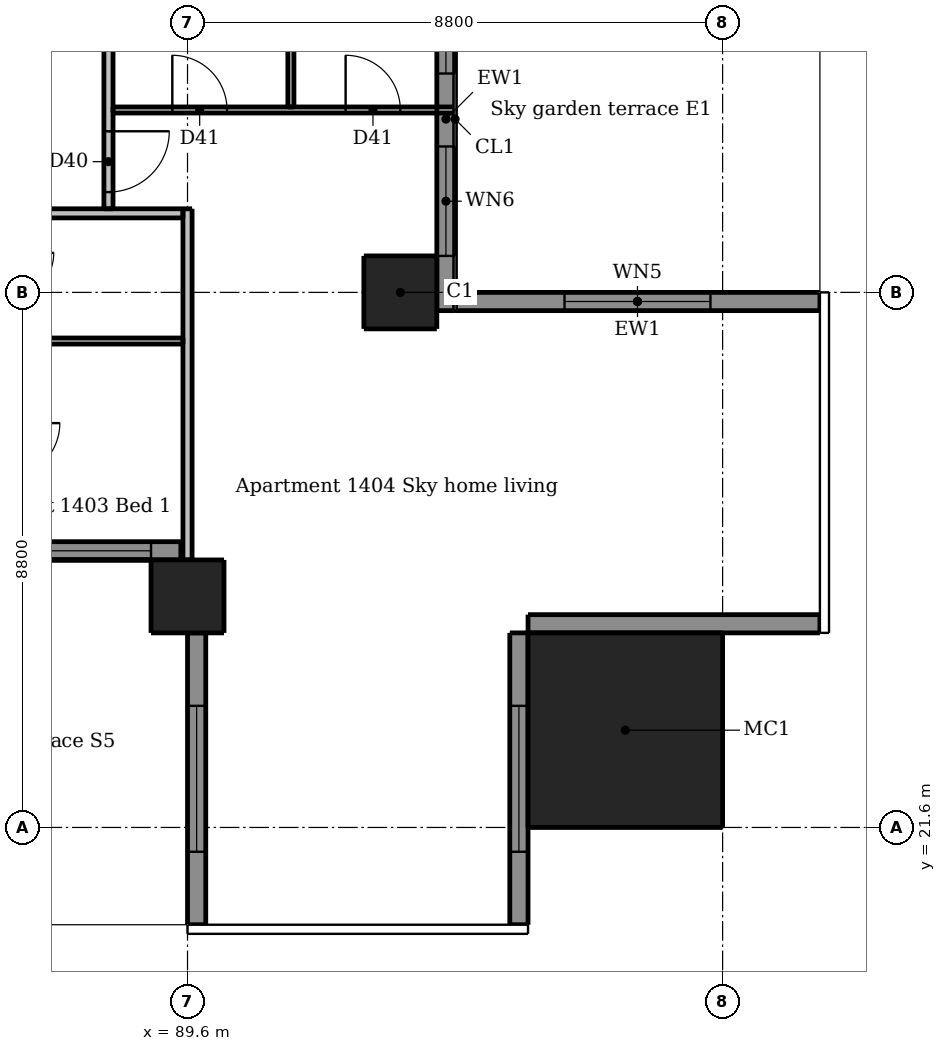
"""IFC4 building model, lengths in metres.
Left out: names, types, materials, properties, quantities, classifications, styles, units other than length and angle.
Written with IfcOpenShell. Run it as: python <this file> out.ifc"""

import sys

from ifc_helpers import new_model, si_unit, direction, frame, frame_2d, origin, origin_2d, place, context, subcontext, project, spatial, rectangle, extrude, element, fill, save


model = new_model("IFC4")
c1 = context("Model", 3, precision=1e-05, world=origin(), true_north=direction((0.0, 1.0)))
c2 = subcontext(c1, "Body", "Model", "MODEL_VIEW")
j1 = project(units=[si_unit("LENGTHUNIT", "METRE"), si_unit("PLANEANGLEUNIT", "RADIAN")], contexts=[c1])
p1 = place(None, origin())
s1 = spatial("IfcSite", under=j1, at=p1, CompositionType="ELEMENT")
p2 = place(p1, origin())
s2 = spatial("IfcBuilding", under=s1, at=p2, CompositionType="ELEMENT")
p3 = place(p2, frame((0.0, 0.0, 53.2)))
s3 = spatial("IfcBuildingStorey", under=s2, at=p3, CompositionType="ELEMENT", Elevation=53.2)
for number, where, z_axis, x_axis in (
    (1, (89.6, 25.4, 0.0), (0.0, 0.0, 1.0), (1.0, 0.0, 0.0)),
    (2, (93.1, 30.4, 0.0), (0.0, 0.0, 1.0), (1.0, 0.0, 0.0)),
):
    element("IfcColumn", number, at=place(p3, frame(where, z_axis=z_axis, x_axis=x_axis)), inside=s3, PredefinedType="COLUMN", context=c2, shape_type="SweptSolid", body=[
        extrude(rectangle(XDim=1.2, YDim=1.2, at=origin_2d()), origin(), (0.0, 0.0, 1.0), 3.05),
    ])
p4 = place(p3, frame((96.8, 23.2, 0.0), z_axis=(0.0, 0.0, 1.0), x_axis=(1.0, 0.0, 0.0)))
e3 = element("IfcColumn", 3, at=p4, inside=s3, PredefinedType="COLUMN", context=c2, shape_type="SweptSolid", body=[
    extrude(rectangle(XDim=3.2, YDim=3.2, at=origin_2d()), origin(), (0.0, 0.0, 1.0), 3.3),
])
p5 = place(p3, frame((89.75, 24.8, 0.0), z_axis=(0.0, 0.0, 1.0), x_axis=(0.0, -1.0, 0.0)))
e4 = element("IfcWall", 4, at=p5, inside=s3, PredefinedType="SOLIDWALL", context=c2, shape_type="SweptSolid", body=[
    extrude(rectangle(XDim=4.8, YDim=0.3, at=frame_2d((2.4, 0.0))), origin(), (0.0, 0.0, 1.0), 3.05),
])
p6 = place(p5, frame((1.2, 0.0, 0.15)))
e5 = element("IfcOpeningElement", 5, at=p6, cuts=e4, PredefinedType="OPENING", context=c2, shape_type="SweptSolid", body=[
    extrude(rectangle(XDim=2.4, YDim=2.1, at=frame_2d((1.2, 1.05))), frame((0.0, 0.16, 0.0), z_axis=(0.0, -1.0, 0.0), x_axis=(1.0, 0.0, 0.0)), (0.0, 0.0, 1.0), 0.32),
])
p7 = place(p3, frame((95.05, 20.0, 0.0), z_axis=(0.0, 0.0, 1.0), x_axis=(0.0, 1.0, 0.0)))
e6 = element("IfcWall", 6, at=p7, inside=s3, PredefinedType="SOLIDWALL", context=c2, shape_type="SweptSolid", body=[
    extrude(rectangle(XDim=4.8, YDim=0.3, at=frame_2d((2.4, 0.0))), origin(), (0.0, 0.0, 1.0), 3.05),
])
p8 = place(p7, frame((1.2, 0.0, 0.15)))
e7 = element("IfcOpeningElement", 7, at=p8, cuts=e6, PredefinedType="OPENING", context=c2, shape_type="SweptSolid", body=[
    extrude(rectangle(XDim=2.4, YDim=2.1, at=frame_2d((1.2, 1.05))), frame((0.0, 0.16, 0.0), z_axis=(0.0, -1.0, 0.0), x_axis=(1.0, 0.0, 0.0)), (0.0, 0.0, 1.0), 0.32),
])
p9 = place(p3, frame((95.2, 24.95, 0.0), z_axis=(0.0, 0.0, 1.0), x_axis=(1.0, 0.0, 0.0)))
e8 = element("IfcWall", 8, at=p9, inside=s3, PredefinedType="SOLIDWALL", context=c2, shape_type="SweptSolid", body=[
    extrude(rectangle(XDim=4.8, YDim=0.3, at=frame_2d((2.4, 0.0))), origin(), (0.0, 0.0, 1.0), 3.05),
])
p10 = place(p3, frame((100.0, 30.25, 0.0), z_axis=(0.0, 0.0, 1.0), x_axis=(-1.0, 0.0, 0.0)))
e9 = element("IfcWall", 9, at=p10, inside=s3, PredefinedType="SOLIDWALL", context=c2, shape_type="SweptSolid", body=[
    extrude(rectangle(XDim=6.0, YDim=0.3, at=frame_2d((3.0, 0.0))), origin(), (0.0, 0.0, 1.0), 3.05),
])
p11 = place(p10, frame((1.8, 0.0, 0.15)))
e10 = element("IfcOpeningElement", 10, at=p11, cuts=e9, PredefinedType="OPENING", context=c2, shape_type="SweptSolid", body=[
    extrude(rectangle(XDim=2.4, YDim=2.1, at=frame_2d((1.2, 1.05))), frame((0.0, 0.16, 0.0), z_axis=(0.0, -1.0, 0.0), x_axis=(1.0, 0.0, 0.0)), (0.0, 0.0, 1.0), 0.32),
])
p12 = place(p3, frame((83.6, 26.15, 0.0), z_axis=(0.0, 0.0, 1.0), x_axis=(1.0, 0.0, 0.0)))
e11 = element("IfcWall", 11, at=p12, inside=s3, PredefinedType="SOLIDWALL", context=c2, shape_type="SweptSolid", body=[
    extrude(rectangle(XDim=5.89, YDim=0.3, at=frame_2d((2.945, 0.0))), origin(), (0.0, 0.0, 1.0), 3.05),
])
p13 = place(p12, frame((0.6, 0.0, 0.15)))
e12 = element("IfcOpeningElement", 12, at=p13, cuts=e11, PredefinedType="OPENING", context=c2, shape_type="SweptSolid", body=[
    extrude(rectangle(XDim=1.8, YDim=2.1, at=frame_2d((0.9, 1.05))), frame((0.0, 0.16, 0.0), z_axis=(0.0, -1.0, 0.0), x_axis=(1.0, 0.0, 0.0)), (0.0, 0.0, 1.0), 0.32),
])
p14 = place(p12, frame((3.6, 0.0, 0.15)))
e13 = element("IfcOpeningElement", 13, at=p14, cuts=e11, PredefinedType="OPENING", context=c2, shape_type="SweptSolid", body=[
    extrude(rectangle(XDim=1.8, YDim=2.1, at=frame_2d((0.9, 1.05))), frame((0.0, 0.16, 0.0), z_axis=(0.0, -1.0, 0.0), x_axis=(1.0, 0.0, 0.0)), (0.0, 0.0, 1.0), 0.32),
])
p15 = place(p3, frame((93.85, 30.1, 0.0), z_axis=(0.0, 0.0, 1.0), x_axis=(0.0, 1.0, 0.0)))
e14 = element("IfcWall", 14, at=p15, inside=s3, PredefinedType="SOLIDWALL", context=c2, shape_type="SweptSolid", body=[
    extrude(rectangle(XDim=6.3, YDim=0.3, at=frame_2d((3.15, 0.0))), origin(), (0.0, 0.0, 1.0), 3.05),
])
p16 = place(p15, frame((0.9, 0.0, 0.15)))
e15 = element("IfcOpeningElement", 15, at=p16, cuts=e14, PredefinedType="OPENING", context=c2, shape_type="SweptSolid", body=[
    extrude(rectangle(XDim=1.8, YDim=2.1, at=frame_2d((0.9, 1.05))), frame((0.0, 0.16, 0.0), z_axis=(0.0, -1.0, 0.0), x_axis=(1.0, 0.0, 0.0)), (0.0, 0.0, 1.0), 0.32),
])
p17 = place(p15, frame((3.9, 0.0, 0.15)))
e16 = element("IfcOpeningElement", 16, at=p17, cuts=e14, PredefinedType="OPENING", context=c2, shape_type="SweptSolid", body=[
    extrude(rectangle(XDim=1.8, YDim=2.1, at=frame_2d((0.9, 1.05))), frame((0.0, 0.16, 0.0), z_axis=(0.0, -1.0, 0.0), x_axis=(1.0, 0.0, 0.0)), (0.0, 0.0, 1.0), 0.32),
])
p18 = place(p3, frame((91.3, 33.45, 0.0), z_axis=(0.0, 0.0, 1.0), x_axis=(0.0, 1.0, 0.0)))
e17 = element("IfcWall", 17, at=p18, inside=s3, PredefinedType="PARTITIONING", context=c2, shape_type="SweptSolid", body=[
    extrude(rectangle(XDim=5.875, YDim=0.1, at=frame_2d((2.938, 0.0))), origin(), (0.0, 0.0, 1.0), 3.05),
])
p19 = place(p18, frame((3.75, 0.0, 0.0)))
e18 = element("IfcOpeningElement", 18, at=p19, cuts=e17, PredefinedType="OPENING", context=c2, shape_type="SweptSolid", body=[
    extrude(rectangle(XDim=0.8, YDim=2.1, at=frame_2d((0.4, 1.05))), frame((0.0, 0.06, 0.0), z_axis=(0.0, -1.0, 0.0), x_axis=(1.0, 0.0, 0.0)), (0.0, 0.0, 1.0), 0.12),
])
p20 = place(p3, frame((88.375, 33.4, 0.0), z_axis=(0.0, 0.0, 1.0), x_axis=(1.0, 0.0, 0.0)))
e19 = element("IfcWall", 19, at=p20, inside=s3, PredefinedType="PARTITIONING", context=c2, shape_type="SweptSolid", body=[
    extrude(rectangle(XDim=5.625, YDim=0.1, at=frame_2d((2.812, 0.0))), origin(), (0.0, 0.0, 1.0), 3.05),
])
p21 = place(p20, frame((0.975, 0.0, 0.0)))
e20 = element("IfcOpeningElement", 20, at=p21, cuts=e19, PredefinedType="OPENING", context=c2, shape_type="SweptSolid", body=[
    extrude(rectangle(XDim=0.9, YDim=2.1, at=frame_2d((0.45, 1.05))), frame((0.0, 0.06, 0.0), z_axis=(0.0, -1.0, 0.0), x_axis=(1.0, 0.0, 0.0)), (0.0, 0.0, 1.0), 0.12),
])
p22 = place(p20, frame((3.825, 0.0, 0.0)))
e21 = element("IfcOpeningElement", 21, at=p22, cuts=e19, PredefinedType="OPENING", context=c2, shape_type="SweptSolid", body=[
    extrude(rectangle(XDim=0.9, YDim=2.1, at=frame_2d((0.45, 1.05))), frame((0.0, 0.06, 0.0), z_axis=(0.0, -1.0, 0.0), x_axis=(1.0, 0.0, 0.0)), (0.0, 0.0, 1.0), 0.12),
])
p23 = place(p3, frame((86.65, 29.6, 0.0), z_axis=(0.0, 0.0, 1.0), x_axis=(1.0, 0.0, 0.0)))
e22 = element("IfcWall", 22, at=p23, inside=s3, PredefinedType="PARTITIONING", context=c2, shape_type="SweptSolid", body=[
    extrude(rectangle(XDim=2.875, YDim=0.1, at=frame_2d((1.438, 0.0))), origin(), (0.0, 0.0, 1.0), 3.05),
])
p24 = place(p3, frame((88.3, 60.475, 0.0), z_axis=(0.0, 0.0, 1.0), x_axis=(0.0, -1.0, 0.0)))
e23 = element("IfcWall", 23, at=p24, inside=s3, PredefinedType="PARTITIONING", context=c2, shape_type="SweptSolid", body=[
    extrude(rectangle(XDim=28.7, YDim=0.15, at=frame_2d((14.35, 0.0))), origin(), (0.0, 0.0, 1.0), 3.05),
])
p25 = place(p24, frame((27.425, 0.0, 0.0)))
e24 = element("IfcOpeningElement", 24, at=p25, cuts=e23, PredefinedType="OPENING", context=c2, shape_type="SweptSolid", body=[
    extrude(rectangle(XDim=1.0, YDim=2.1, at=frame_2d((0.5, 1.05))), frame((0.0, 0.085, 0.0), z_axis=(0.0, -1.0, 0.0), x_axis=(1.0, 0.0, 0.0)), (0.0, 0.0, 1.0), 0.17),
])
p26 = place(p24, frame((11.575, 0.0, 0.0)))
e25 = element("IfcOpeningElement", 25, at=p26, cuts=e23, PredefinedType="OPENING", context=c2, shape_type="SweptSolid", body=[
    extrude(rectangle(XDim=1.0, YDim=2.1, at=frame_2d((0.5, 1.05))), frame((0.0, 0.085, 0.0), z_axis=(0.0, -1.0, 0.0), x_axis=(1.0, 0.0, 0.0)), (0.0, 0.0, 1.0), 0.17),
])
p27 = place(p24, frame((2.575, 0.0, 0.0)))
e26 = element("IfcOpeningElement", 26, at=p27, cuts=e23, PredefinedType="OPENING", context=c2, shape_type="SweptSolid", body=[
    extrude(rectangle(XDim=1.0, YDim=2.1, at=frame_2d((0.5, 1.05))), frame((0.0, 0.085, 0.0), z_axis=(0.0, -1.0, 0.0), x_axis=(1.0, 0.0, 0.0)), (0.0, 0.0, 1.0), 0.17),
])
p28 = place(p3, frame((89.6, 26.0, 0.0), z_axis=(0.0, 0.0, 1.0), x_axis=(0.0, 1.0, 0.0)))
e27 = element("IfcWall", 27, at=p28, inside=s3, PredefinedType="PARTITIONING", context=c2, shape_type="SweptSolid", body=[
    extrude(rectangle(XDim=5.775, YDim=0.15, at=frame_2d((2.887, 0.0))), origin(), (0.0, 0.0, 1.0), 2.516),
])
p29 = place(p3, frame((89.525, 31.7, 0.0), z_axis=(0.0, 0.0, 1.0), x_axis=(-1.0, 0.0, 0.0)))
e28 = element("IfcWall", 28, at=p29, inside=s3, PredefinedType="PARTITIONING", context=c2, shape_type="SweptSolid", body=[
    extrude(rectangle(XDim=28.75, YDim=0.15, at=frame_2d((14.375, 0.0))), origin(), (0.0, 0.0, 1.0), 3.05),
])
p30 = place(p29, frame((27.375, 0.0, 0.0)))
e29 = element("IfcOpeningElement", 29, at=p30, cuts=e28, PredefinedType="OPENING", context=c2, shape_type="SweptSolid", body=[
    extrude(rectangle(XDim=1.0, YDim=2.1, at=frame_2d((0.5, 1.05))), frame((0.0, 0.085, 0.0), z_axis=(0.0, -1.0, 0.0), x_axis=(1.0, 0.0, 0.0)), (0.0, 0.0, 1.0), 0.17),
])
p31 = place(p29, frame((12.625, 0.0, 0.0)))
e30 = element("IfcOpeningElement", 30, at=p31, cuts=e28, PredefinedType="OPENING", context=c2, shape_type="SweptSolid", body=[
    extrude(rectangle(XDim=1.0, YDim=2.1, at=frame_2d((0.5, 1.05))), frame((0.0, 0.085, 0.0), z_axis=(0.0, -1.0, 0.0), x_axis=(1.0, 0.0, 0.0)), (0.0, 0.0, 1.0), 0.17),
])
p32 = place(p29, frame((4.225, 0.0, 0.0)))
e31 = element("IfcOpeningElement", 31, at=p32, cuts=e28, PredefinedType="OPENING", context=c2, shape_type="SweptSolid", body=[
    extrude(rectangle(XDim=1.0, YDim=2.1, at=frame_2d((0.5, 1.05))), frame((0.0, 0.085, 0.0), z_axis=(0.0, -1.0, 0.0), x_axis=(1.0, 0.0, 0.0)), (0.0, 0.0, 1.0), 0.17),
])
p33 = place(p6, origin())
e32 = element("IfcWindow", 32, at=p33, inside=s3, PartitioningType="DOUBLE_PANEL_VERTICAL", PredefinedType="WINDOW", context=c2, shape_type="SweptSolid", body=[
    extrude(rectangle(XDim=2.4, YDim=2.1, at=frame_2d((1.2, 1.05))), frame((0.0, 0.03, 0.0), z_axis=(0.0, -1.0, 0.0), x_axis=(1.0, 0.0, 0.0)), (0.0, 0.0, 1.0), 0.06),
])
fill(e5, e32)
p34 = place(p8, origin())
e33 = element("IfcWindow", 33, at=p34, inside=s3, PartitioningType="DOUBLE_PANEL_VERTICAL", PredefinedType="WINDOW", context=c2, shape_type="SweptSolid", body=[
    extrude(rectangle(XDim=2.4, YDim=2.1, at=frame_2d((1.2, 1.05))), frame((0.0, 0.03, 0.0), z_axis=(0.0, -1.0, 0.0), x_axis=(1.0, 0.0, 0.0)), (0.0, 0.0, 1.0), 0.06),
])
fill(e7, e33)
p35 = place(p11, origin())
e34 = element("IfcWindow", 34, at=p35, inside=s3, PartitioningType="DOUBLE_PANEL_VERTICAL", PredefinedType="WINDOW", context=c2, shape_type="SweptSolid", body=[
    extrude(rectangle(XDim=2.4, YDim=2.1, at=frame_2d((1.2, 1.05))), frame((0.0, 0.03, 0.0), z_axis=(0.0, -1.0, 0.0), x_axis=(1.0, 0.0, 0.0)), (0.0, 0.0, 1.0), 0.06),
])
fill(e10, e34)
p36 = place(p14, origin())
e35 = element("IfcWindow", 35, at=p36, inside=s3, PartitioningType="DOUBLE_PANEL_VERTICAL", PredefinedType="WINDOW", context=c2, shape_type="SweptSolid", body=[
    extrude(rectangle(XDim=1.8, YDim=2.1, at=frame_2d((0.9, 1.05))), frame((0.0, 0.03, 0.0), z_axis=(0.0, -1.0, 0.0), x_axis=(1.0, 0.0, 0.0)), (0.0, 0.0, 1.0), 0.06),
])
fill(e13, e35)
p37 = place(p16, origin())
e36 = element("IfcWindow", 36, at=p37, inside=s3, PartitioningType="DOUBLE_PANEL_VERTICAL", PredefinedType="WINDOW", context=c2, shape_type="SweptSolid", body=[
    extrude(rectangle(XDim=1.8, YDim=2.1, at=frame_2d((0.9, 1.05))), frame((0.0, 0.03, 0.0), z_axis=(0.0, -1.0, 0.0), x_axis=(1.0, 0.0, 0.0)), (0.0, 0.0, 1.0), 0.06),
])
fill(e15, e36)
p38 = place(p17, origin())
e37 = element("IfcWindow", 37, at=p38, inside=s3, PartitioningType="DOUBLE_PANEL_VERTICAL", PredefinedType="WINDOW", context=c2, shape_type="SweptSolid", body=[
    extrude(rectangle(XDim=1.8, YDim=2.1, at=frame_2d((0.9, 1.05))), frame((0.0, 0.03, 0.0), z_axis=(0.0, -1.0, 0.0), x_axis=(1.0, 0.0, 0.0)), (0.0, 0.0, 1.0), 0.06),
])
fill(e16, e37)
p39 = place(p25, origin())
e38 = element("IfcDoor", 38, at=p39, inside=s3, OperationType="SINGLE_SWING_LEFT", PredefinedType="DOOR", context=c2, shape_type="SweptSolid", body=[
    extrude(rectangle(XDim=1.0, YDim=2.1, at=frame_2d((0.5, 1.05))), frame((0.0, 0.025, 0.0), z_axis=(0.0, -1.0, 0.0), x_axis=(1.0, 0.0, 0.0)), (0.0, 0.0, 1.0), 0.05),
])
fill(e24, e38)
p40 = place(p21, origin())
e39 = element("IfcDoor", 39, at=p40, inside=s3, OperationType="SINGLE_SWING_LEFT", PredefinedType="DOOR", context=c2, shape_type="SweptSolid", body=[
    extrude(rectangle(XDim=0.9, YDim=2.1, at=frame_2d((0.45, 1.05))), frame((0.0, 0.025, 0.0), z_axis=(0.0, -1.0, 0.0), x_axis=(1.0, 0.0, 0.0)), (0.0, 0.0, 1.0), 0.05),
])
fill(e20, e39)
p41 = place(p22, origin())
e40 = element("IfcDoor", 40, at=p41, inside=s3, OperationType="SINGLE_SWING_LEFT", PredefinedType="DOOR", context=c2, shape_type="SweptSolid", body=[
    extrude(rectangle(XDim=0.9, YDim=2.1, at=frame_2d((0.45, 1.05))), frame((0.0, 0.025, 0.0), z_axis=(0.0, -1.0, 0.0), x_axis=(1.0, 0.0, 0.0)), (0.0, 0.0, 1.0), 0.05),
])
fill(e21, e40)
save(model, sys.argv[1])
